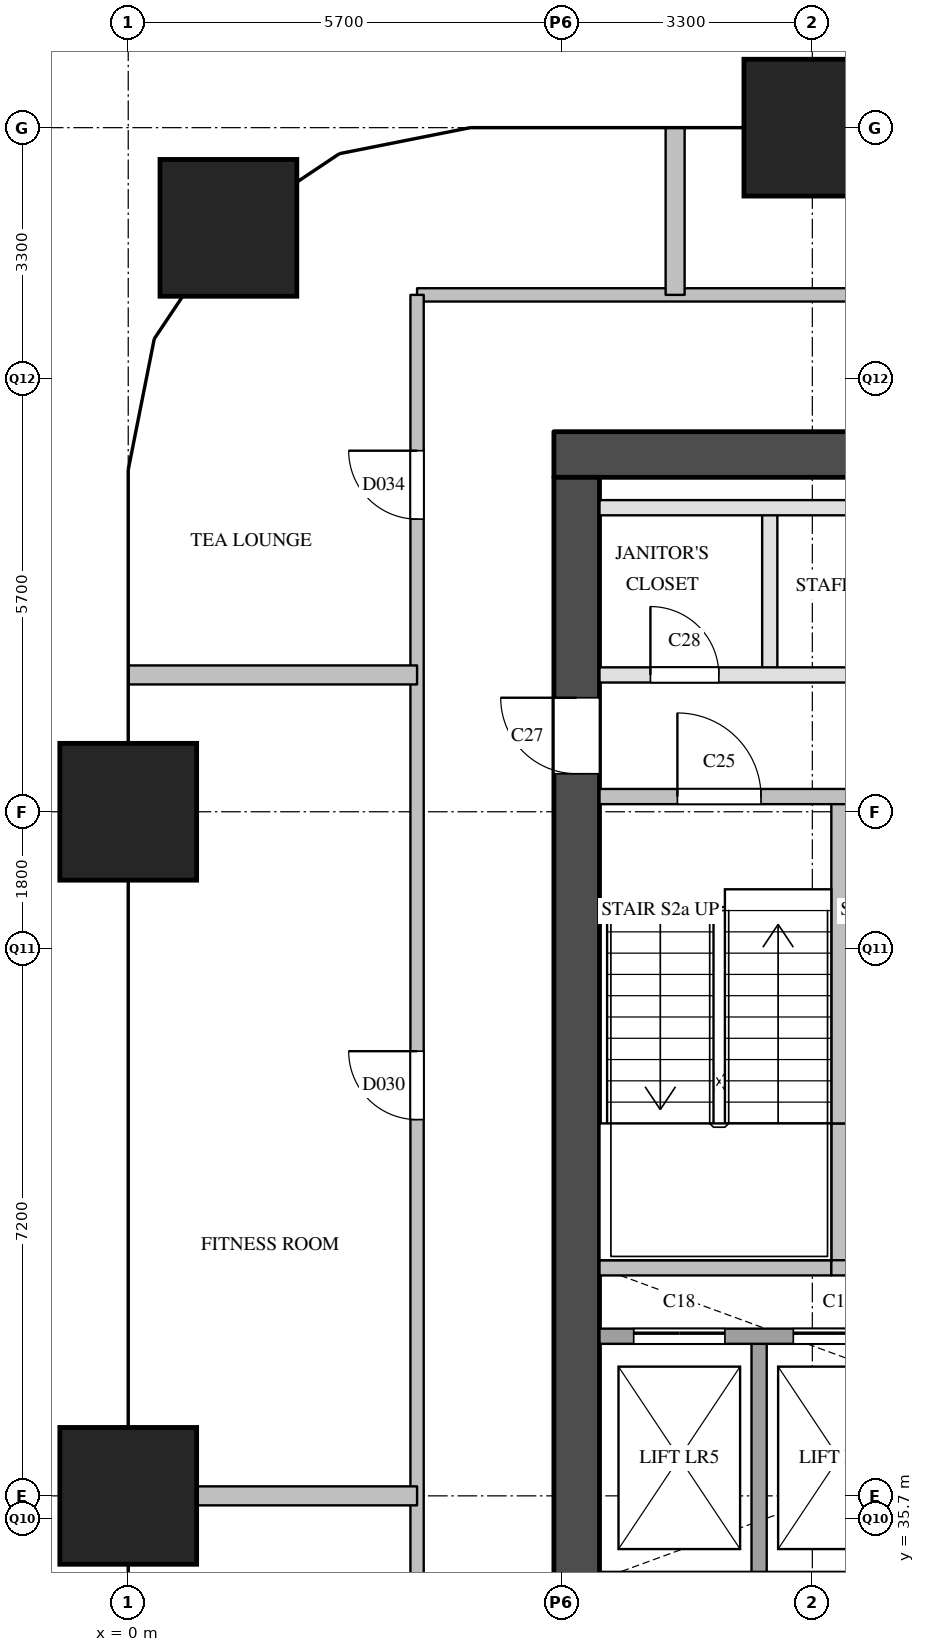
"""IFC4 building model, lengths in metres.
Left out: names, types, materials, properties, quantities, classifications, styles, units other than length and angle.
Written with IfcOpenShell. Run it as: python <this file> out.ifc"""

import sys

from ifc_helpers import new_model, si_unit, direction, frame, frame_2d, origin, origin_2d, place, context, subcontext, project, spatial, rectangle, extrude, element, fill, save


model = new_model("IFC4")
c1 = context("Model", 3, precision=1e-05, world=origin(), true_north=direction((0.0, 1.0)))
c2 = subcontext(c1, "Body", "Model", "MODEL_VIEW")
j1 = project(units=[si_unit("LENGTHUNIT", "METRE"), si_unit("PLANEANGLEUNIT", "RADIAN")], contexts=[c1])
p1 = place(None, origin())
s1 = spatial("IfcSite", under=j1, at=p1, CompositionType="ELEMENT")
p2 = place(p1, origin())
s2 = spatial("IfcBuilding", under=s1, at=p2, CompositionType="ELEMENT")
p3 = place(p2, frame((0.0, 0.0, 112.0)))
s3 = spatial("IfcBuildingStorey", under=s2, at=p3, CompositionType="ELEMENT", Elevation=112.0)
for number, where, z_axis, x_axis in (
    (1, (0.0, 36.0, 0.0), (0.0, 0.0, 1.0), (1.0, 0.0, 0.0)),
    (2, (0.0, 45.0, 0.0), (0.0, 0.0, 1.0), (1.0, 0.0, 0.0)),
    (3, (1.318, 52.682, 0.0), (0.0, 0.0, 1.0), (1.0, 0.0, 0.0)),
    (4, (9.0, 54.0, 0.0), (0.0, 0.0, 1.0), (1.0, 0.0, 0.0)),
):
    element("IfcColumn", number, at=place(p3, frame(where, z_axis=z_axis, x_axis=x_axis)), inside=s3, PredefinedType="COLUMN", context=c2, shape_type="SweptSolid", body=[
        extrude(rectangle(XDim=1.8, YDim=1.8, at=origin_2d()), origin(), (0.0, 0.0, 1.0), 3.8),
    ])
p4 = place(p3, frame((5.6, 49.7, 0.0), z_axis=(0.0, 0.0, 1.0), x_axis=(1.0, 0.0, 0.0)))
e5 = element("IfcWall", 5, at=p4, inside=s3, PredefinedType="SHEAR", context=c2, shape_type="SweptSolid", body=[
    extrude(rectangle(XDim=12.4, YDim=0.6, at=frame_2d((6.2, 0.0))), origin(), (0.0, 0.0, 1.0), 3.5),
])
p5 = place(p3, frame((5.9, 29.1, 0.0), z_axis=(0.0, 0.0, 1.0), x_axis=(0.0, 1.0, 0.0)))
e6 = element("IfcWall", 6, at=p5, inside=s3, PredefinedType="SHEAR", context=c2, shape_type="SweptSolid", body=[
    extrude(rectangle(XDim=20.3, YDim=0.6, at=frame_2d((10.15, 0.0))), origin(), (0.0, 0.0, 1.0), 3.5),
])
p6 = place(p5, frame((3.6, 0.0, 0.0)))
e7 = element("IfcOpeningElement", 7, at=p6, cuts=e6, PredefinedType="OPENING", context=c2, shape_type="SweptSolid", body=[
    extrude(rectangle(XDim=1.8, YDim=2.1, at=frame_2d((0.9, 1.05))), frame((0.0, 0.31, 0.0), z_axis=(0.0, -1.0, 0.0), x_axis=(1.0, 0.0, 0.0)), (0.0, 0.0, 1.0), 0.62),
])
p7 = place(p5, frame((16.4, 0.0, 0.0)))
e8 = element("IfcOpeningElement", 8, at=p7, cuts=e6, PredefinedType="OPENING", context=c2, shape_type="SweptSolid", body=[
    extrude(rectangle(XDim=1.0, YDim=2.1, at=frame_2d((0.5, 1.05))), frame((0.0, 0.31, 0.0), z_axis=(0.0, -1.0, 0.0), x_axis=(1.0, 0.0, 0.0)), (0.0, 0.0, 1.0), 0.62),
])
p8 = place(p3, frame((8.3, 34.9, 0.0), z_axis=(0.0, 0.0, 1.0), x_axis=(0.0, 1.0, 0.0)))
e9 = element("IfcWall", 9, at=p8, inside=s3, PredefinedType="SOLIDWALL", context=c2, shape_type="SweptSolid", body=[
    extrude(rectangle(XDim=3.2, YDim=0.2, at=frame_2d((1.6, 0.0))), origin(), (0.0, 0.0, 1.0), 3.5),
])
p9 = place(p3, frame((8.44, 46.8, 0.0), z_axis=(0.0, 0.0, 1.0), x_axis=(0.0, 1.0, 0.0)))
e10 = element("IfcWall", 10, at=p9, inside=s3, PredefinedType="PARTITIONING", context=c2, shape_type="SweptSolid", body=[
    extrude(rectangle(XDim=2.2, YDim=0.2, at=frame_2d((1.1, 0.0))), origin(), (0.0, 0.0, 1.0), 3.5),
])
p10 = place(p3, frame((9.35, 39.0, 0.0), z_axis=(0.0, 0.0, 1.0), x_axis=(0.0, 1.0, 0.0)))
e11 = element("IfcWall", 11, at=p10, inside=s3, PredefinedType="SOLIDWALL", context=c2, shape_type="SweptSolid", body=[
    extrude(rectangle(XDim=1.9, YDim=0.2, at=frame_2d((0.95, 0.0))), origin(), (0.0, 0.0, 1.0), 3.5),
])
p11 = place(p3, frame((9.35, 40.9, 0.0), z_axis=(0.0, 0.0, 1.0), x_axis=(0.0, 1.0, 0.0)))
e12 = element("IfcWall", 12, at=p11, inside=s3, PredefinedType="SOLIDWALL", context=c2, shape_type="SweptSolid", body=[
    extrude(rectangle(XDim=4.3, YDim=0.2, at=frame_2d((2.15, 0.0))), origin(), (0.0, 0.0, 1.0), 3.5),
])
p12 = place(p3, frame((6.2, 38.1, 0.0), z_axis=(0.0, 0.0, 1.0), x_axis=(1.0, 0.0, 0.0)))
e13 = element("IfcWall", 13, at=p12, inside=s3, PredefinedType="SOLIDWALL", context=c2, shape_type="SweptSolid", body=[
    extrude(rectangle(XDim=11.2, YDim=0.2, at=frame_2d((5.6, 0.0))), origin(), (0.0, 0.0, 1.0), 3.5),
])
p13 = place(p12, frame((0.45, 0.0, 0.0)))
e14 = element("IfcOpeningElement", 14, at=p13, cuts=e13, PredefinedType="OPENING", context=c2, shape_type="SweptSolid", body=[
    extrude(rectangle(XDim=1.2, YDim=2.1, at=frame_2d((0.6, 1.05))), frame((0.0, 0.11, 0.0), z_axis=(0.0, -1.0, 0.0), x_axis=(1.0, 0.0, 0.0)), (0.0, 0.0, 1.0), 0.22),
])
p14 = place(p12, frame((2.55, 0.0, 0.0)))
e15 = element("IfcOpeningElement", 15, at=p14, cuts=e13, PredefinedType="OPENING", context=c2, shape_type="SweptSolid", body=[
    extrude(rectangle(XDim=1.2, YDim=2.1, at=frame_2d((0.6, 1.05))), frame((0.0, 0.11, 0.0), z_axis=(0.0, -1.0, 0.0), x_axis=(1.0, 0.0, 0.0)), (0.0, 0.0, 1.0), 0.22),
])
p15 = place(p12, frame((4.65, 0.0, 0.0)))
e16 = element("IfcOpeningElement", 16, at=p15, cuts=e13, PredefinedType="OPENING", context=c2, shape_type="SweptSolid", body=[
    extrude(rectangle(XDim=1.2, YDim=2.1, at=frame_2d((0.6, 1.05))), frame((0.0, 0.11, 0.0), z_axis=(0.0, -1.0, 0.0), x_axis=(1.0, 0.0, 0.0)), (0.0, 0.0, 1.0), 0.22),
])
p16 = place(p12, frame((6.75, 0.0, 0.0)))
e17 = element("IfcOpeningElement", 17, at=p16, cuts=e13, PredefinedType="OPENING", context=c2, shape_type="SweptSolid", body=[
    extrude(rectangle(XDim=1.2, YDim=2.1, at=frame_2d((0.6, 1.05))), frame((0.0, 0.11, 0.0), z_axis=(0.0, -1.0, 0.0), x_axis=(1.0, 0.0, 0.0)), (0.0, 0.0, 1.0), 0.22),
])
p17 = place(p3, frame((6.2, 39.0, 0.0), z_axis=(0.0, 0.0, 1.0), x_axis=(1.0, 0.0, 0.0)))
e18 = element("IfcWall", 18, at=p17, inside=s3, PredefinedType="SOLIDWALL", context=c2, shape_type="SweptSolid", body=[
    extrude(rectangle(XDim=3.05, YDim=0.2, at=frame_2d((1.525, 0.0))), origin(), (0.0, 0.0, 1.0), 3.5),
])
p18 = place(p3, frame((9.25, 39.0, 0.0), z_axis=(0.0, 0.0, 1.0), x_axis=(1.0, 0.0, 0.0)))
e19 = element("IfcWall", 19, at=p18, inside=s3, PredefinedType="SOLIDWALL", context=c2, shape_type="SweptSolid", body=[
    extrude(rectangle(XDim=0.2, YDim=0.2, at=frame_2d((0.1, 0.0))), origin(), (0.0, 0.0, 1.0), 3.5),
])
p19 = place(p3, frame((6.2, 45.2, 0.0), z_axis=(0.0, 0.0, 1.0), x_axis=(1.0, 0.0, 0.0)))
e20 = element("IfcWall", 20, at=p19, inside=s3, PredefinedType="SOLIDWALL", context=c2, shape_type="SweptSolid", body=[
    extrude(rectangle(XDim=6.3, YDim=0.2, at=frame_2d((3.15, 0.0))), origin(), (0.0, 0.0, 1.0), 3.5),
])
p20 = place(p19, frame((1.025, 0.0, 0.0)))
e21 = element("IfcOpeningElement", 21, at=p20, cuts=e20, PredefinedType="OPENING", context=c2, shape_type="SweptSolid", body=[
    extrude(rectangle(XDim=1.1, YDim=2.1, at=frame_2d((0.55, 1.05))), frame((0.0, 0.11, 0.0), z_axis=(0.0, -1.0, 0.0), x_axis=(1.0, 0.0, 0.0)), (0.0, 0.0, 1.0), 0.22),
])
p21 = place(p19, frame((4.175, 0.0, 0.0)))
e22 = element("IfcOpeningElement", 22, at=p21, cuts=e20, PredefinedType="OPENING", context=c2, shape_type="SweptSolid", body=[
    extrude(rectangle(XDim=1.1, YDim=2.1, at=frame_2d((0.55, 1.05))), frame((0.0, 0.11, 0.0), z_axis=(0.0, -1.0, 0.0), x_axis=(1.0, 0.0, 0.0)), (0.0, 0.0, 1.0), 0.22),
])
p22 = place(p3, frame((6.2, 46.8, 0.0), z_axis=(0.0, 0.0, 1.0), x_axis=(1.0, 0.0, 0.0)))
e23 = element("IfcWall", 23, at=p22, inside=s3, PredefinedType="PARTITIONING", context=c2, shape_type="SweptSolid", body=[
    extrude(rectangle(XDim=11.2, YDim=0.2, at=frame_2d((5.6, 0.0))), origin(), (0.0, 0.0, 1.0), 3.5),
])
p23 = place(p22, frame((0.67, 0.0, 0.0)))
e24 = element("IfcOpeningElement", 24, at=p23, cuts=e23, PredefinedType="OPENING", context=c2, shape_type="SweptSolid", body=[
    extrude(rectangle(XDim=0.9, YDim=2.1, at=frame_2d((0.45, 1.05))), frame((0.0, 0.11, 0.0), z_axis=(0.0, -1.0, 0.0), x_axis=(1.0, 0.0, 0.0)), (0.0, 0.0, 1.0), 0.22),
])
p24 = place(p22, frame((4.59, 0.0, 0.0)))
e25 = element("IfcOpeningElement", 25, at=p24, cuts=e23, PredefinedType="OPENING", context=c2, shape_type="SweptSolid", body=[
    extrude(rectangle(XDim=0.9, YDim=2.1, at=frame_2d((0.45, 1.05))), frame((0.0, 0.11, 0.0), z_axis=(0.0, -1.0, 0.0), x_axis=(1.0, 0.0, 0.0)), (0.0, 0.0, 1.0), 0.22),
])
p25 = place(p22, frame((9.07, 0.0, 0.0)))
e26 = element("IfcOpeningElement", 26, at=p25, cuts=e23, PredefinedType="OPENING", context=c2, shape_type="SweptSolid", body=[
    extrude(rectangle(XDim=0.9, YDim=2.1, at=frame_2d((0.45, 1.05))), frame((0.0, 0.11, 0.0), z_axis=(0.0, -1.0, 0.0), x_axis=(1.0, 0.0, 0.0)), (0.0, 0.0, 1.0), 0.22),
])
p26 = place(p3, frame((6.2, 49.0, 0.0), z_axis=(0.0, 0.0, 1.0), x_axis=(1.0, 0.0, 0.0)))
e27 = element("IfcWall", 27, at=p26, inside=s3, PredefinedType="PARTITIONING", context=c2, shape_type="SweptSolid", body=[
    extrude(rectangle(XDim=11.2, YDim=0.2, at=frame_2d((5.6, 0.0))), origin(), (0.0, 0.0, 1.0), 3.5),
])
p27 = place(p3, frame((3.8, 51.8, 0.0), z_axis=(0.0, 0.0, 1.0), x_axis=(1.0, 0.0, 0.0)))
e28 = element("IfcWall", 28, at=p27, inside=s3, PredefinedType="PARTITIONING", context=c2, shape_type="SweptSolid", body=[
    extrude(rectangle(XDim=16.0, YDim=0.175, at=frame_2d((8.0, 0.0))), origin(), (0.0, 0.0, 1.0), 3.5),
])
p28 = place(p27, frame((8.298, 0.0, 0.0)))
e29 = element("IfcOpeningElement", 29, at=p28, cuts=e28, PredefinedType="OPENING", context=c2, shape_type="SweptSolid", body=[
    extrude(rectangle(XDim=1.0, YDim=2.1, at=frame_2d((0.5, 1.05))), frame((0.0, 0.097, 0.0), z_axis=(0.0, -1.0, 0.0), x_axis=(1.0, 0.0, 0.0)), (0.0, 0.0, 1.0), 0.195),
])
p29 = place(p3, frame((3.8, 28.5, 0.0), z_axis=(0.0, 0.0, 1.0), x_axis=(0.0, 1.0, 0.0)))
e30 = element("IfcWall", 30, at=p29, inside=s3, PredefinedType="PARTITIONING", context=c2, shape_type="SweptSolid", body=[
    extrude(rectangle(XDim=23.3, YDim=0.175, at=frame_2d((11.65, 0.0))), origin(), (0.0, 0.0, 1.0), 3.5),
])
p30 = place(p29, frame((3.3, 0.0, 0.0)))
e31 = element("IfcOpeningElement", 31, at=p30, cuts=e30, PredefinedType="OPENING", context=c2, shape_type="SweptSolid", body=[
    extrude(rectangle(XDim=0.9, YDim=2.1, at=frame_2d((0.45, 1.05))), frame((0.0, 0.097, 0.0), z_axis=(0.0, -1.0, 0.0), x_axis=(1.0, 0.0, 0.0)), (0.0, 0.0, 1.0), 0.195),
])
p31 = place(p29, frame((12.45, 0.0, 0.0)))
e32 = element("IfcOpeningElement", 32, at=p31, cuts=e30, PredefinedType="OPENING", context=c2, shape_type="SweptSolid", body=[
    extrude(rectangle(XDim=0.9, YDim=2.1, at=frame_2d((0.45, 1.05))), frame((0.0, 0.097, 0.0), z_axis=(0.0, -1.0, 0.0), x_axis=(1.0, 0.0, 0.0)), (0.0, 0.0, 1.0), 0.195),
])
p32 = place(p29, frame((20.35, 0.0, 0.0)))
e33 = element("IfcOpeningElement", 33, at=p32, cuts=e30, PredefinedType="OPENING", context=c2, shape_type="SweptSolid", body=[
    extrude(rectangle(XDim=0.9, YDim=2.1, at=frame_2d((0.45, 1.05))), frame((0.0, 0.097, 0.0), z_axis=(0.0, -1.0, 0.0), x_axis=(1.0, 0.0, 0.0)), (0.0, 0.0, 1.0), 0.195),
])
p33 = place(p3, frame((0.0, 36.0, 0.0), z_axis=(0.0, 0.0, 1.0), x_axis=(1.0, 0.0, 0.0)))
e34 = element("IfcWall", 34, at=p33, inside=s3, PredefinedType="PARTITIONING", context=c2, shape_type="SweptSolid", body=[
    extrude(rectangle(XDim=3.8, YDim=0.25, at=frame_2d((1.9, 0.0))), origin(), (0.0, 0.0, 1.0), 3.5),
])
p34 = place(p3, frame((0.0, 46.8, 0.0), z_axis=(0.0, 0.0, 1.0), x_axis=(1.0, 0.0, 0.0)))
e35 = element("IfcWall", 35, at=p34, inside=s3, PredefinedType="PARTITIONING", context=c2, shape_type="SweptSolid", body=[
    extrude(rectangle(XDim=3.8, YDim=0.25, at=frame_2d((1.9, 0.0))), origin(), (0.0, 0.0, 1.0), 2.5),
])
p35 = place(p3, frame((7.195, 51.8, 0.0), z_axis=(0.0, 0.0, 1.0), x_axis=(0.0, 1.0, 0.0)))
e36 = element("IfcWall", 36, at=p35, inside=s3, PredefinedType="PARTITIONING", context=c2, shape_type="SweptSolid", body=[
    extrude(rectangle(XDim=2.2, YDim=0.25, at=frame_2d((1.1, 0.0))), origin(), (0.0, 0.0, 1.0), 2.5),
])
p36 = place(p13, origin())
e37 = element("IfcDoor", 37, at=p36, inside=s3, OperationType="SLIDING_TO_LEFT", PredefinedType="DOOR", context=c2, shape_type="SweptSolid", body=[
    extrude(rectangle(XDim=1.2, YDim=2.1, at=frame_2d((0.6, 1.05))), frame((0.0, 0.025, 0.0), z_axis=(0.0, -1.0, 0.0), x_axis=(1.0, 0.0, 0.0)), (0.0, 0.0, 1.0), 0.05),
])
fill(e14, e37)
p37 = place(p14, origin())
e38 = element("IfcDoor", 38, at=p37, inside=s3, OperationType="SLIDING_TO_LEFT", PredefinedType="DOOR", context=c2, shape_type="SweptSolid", body=[
    extrude(rectangle(XDim=1.2, YDim=2.1, at=frame_2d((0.6, 1.05))), frame((0.0, 0.025, 0.0), z_axis=(0.0, -1.0, 0.0), x_axis=(1.0, 0.0, 0.0)), (0.0, 0.0, 1.0), 0.05),
])
fill(e15, e38)
p38 = place(p20, origin())
e39 = element("IfcDoor", 39, at=p38, inside=s3, OperationType="SINGLE_SWING_LEFT", PredefinedType="DOOR", context=c2, shape_type="SweptSolid", body=[
    extrude(rectangle(XDim=1.1, YDim=2.1, at=frame_2d((0.55, 1.05))), frame((0.0, 0.025, 0.0), z_axis=(0.0, -1.0, 0.0), x_axis=(1.0, 0.0, 0.0)), (0.0, 0.0, 1.0), 0.05),
])
fill(e21, e39)
p39 = place(p7, origin())
e40 = element("IfcDoor", 40, at=p39, inside=s3, OperationType="SINGLE_SWING_RIGHT", PredefinedType="DOOR", context=c2, shape_type="SweptSolid", body=[
    extrude(rectangle(XDim=1.0, YDim=2.1, at=frame_2d((0.5, 1.05))), frame((0.0, 0.025, 0.0), z_axis=(0.0, -1.0, 0.0), x_axis=(1.0, 0.0, 0.0)), (0.0, 0.0, 1.0), 0.05),
])
fill(e8, e40)
p40 = place(p23, origin())
e41 = element("IfcDoor", 41, at=p40, inside=s3, OperationType="SINGLE_SWING_LEFT", PredefinedType="DOOR", context=c2, shape_type="SweptSolid", body=[
    extrude(rectangle(XDim=0.9, YDim=2.1, at=frame_2d((0.45, 1.05))), frame((0.0, 0.025, 0.0), z_axis=(0.0, -1.0, 0.0), x_axis=(1.0, 0.0, 0.0)), (0.0, 0.0, 1.0), 0.05),
])
fill(e24, e41)
p41 = place(p31, origin())
e42 = element("IfcDoor", 42, at=p41, inside=s3, OperationType="SINGLE_SWING_RIGHT", PredefinedType="DOOR", context=c2, shape_type="SweptSolid", body=[
    extrude(rectangle(XDim=0.9, YDim=2.1, at=frame_2d((0.45, 1.05))), frame((0.0, 0.025, 0.0), z_axis=(0.0, -1.0, 0.0), x_axis=(1.0, 0.0, 0.0)), (0.0, 0.0, 1.0), 0.05),
])
fill(e32, e42)
p42 = place(p32, origin())
e43 = element("IfcDoor", 43, at=p42, inside=s3, OperationType="SINGLE_SWING_RIGHT", PredefinedType="DOOR", context=c2, shape_type="SweptSolid", body=[
    extrude(rectangle(XDim=0.9, YDim=2.1, at=frame_2d((0.45, 1.05))), frame((0.0, 0.025, 0.0), z_axis=(0.0, -1.0, 0.0), x_axis=(1.0, 0.0, 0.0)), (0.0, 0.0, 1.0), 0.05),
])
fill(e33, e43)
save(model, sys.argv[1])
